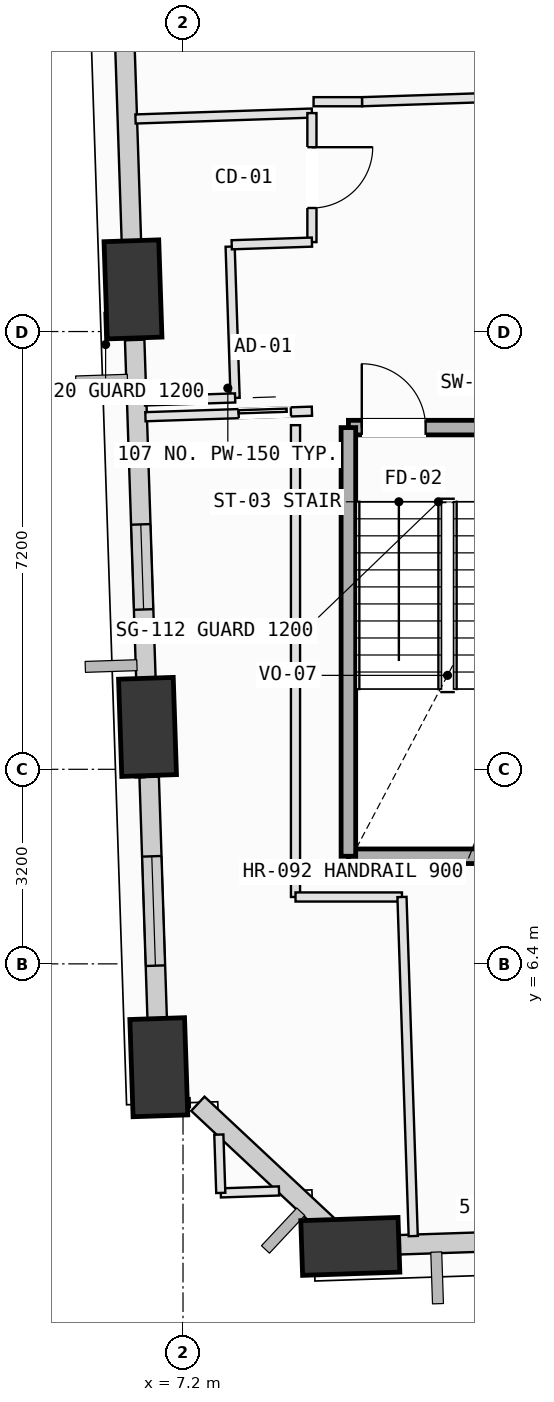
"""IFC4 building model, lengths in metres.
Left out: names, types, materials, properties, quantities, classifications, styles, units other than length and angle.
Written with IfcOpenShell. Run it as: python <this file> out.ifc"""

import sys

from ifc_helpers import new_model, si_unit, direction, frame, frame_2d, origin, origin_2d, place, context, subcontext, project, spatial, rectangle, extrude, element, fill, save


model = new_model("IFC4")
c1 = context("Model", 3, precision=1e-05, world=origin(), true_north=direction((0.0, 1.0)))
c2 = subcontext(c1, "Body", "Model", "MODEL_VIEW")
j1 = project(units=[si_unit("LENGTHUNIT", "METRE"), si_unit("PLANEANGLEUNIT", "RADIAN")], contexts=[c1])
p1 = place(None, origin())
s1 = spatial("IfcSite", under=j1, at=p1, CompositionType="ELEMENT")
p2 = place(p1, origin())
s2 = spatial("IfcBuilding", under=s1, at=p2, CompositionType="ELEMENT")
p3 = place(p2, frame((0.0, 0.0, 31.0)))
s3 = spatial("IfcBuildingStorey", under=s2, at=p3, CompositionType="ELEMENT", Elevation=31.0)
p4 = place(p3, frame((9.951, 1.753, 0.002), z_axis=(0.095504651376, -0.096351967674, 0.990754843486), x_axis=(0.686707556707, 0.726919871615, 0.004497978688)))
e1 = element("IfcColumn", 1, at=p4, inside=s3, PredefinedType="COLUMN", context=c2, shape_type="SweptSolid", body=[
    extrude(rectangle(XDim=1.6, YDim=0.9, at=origin_2d()), origin(), (0.0, 0.0, 1.0), 4.034),
])
p5 = place(p3, frame((6.377, 17.493, 0.002), z_axis=(0.031004754725, -0.111823410878, 0.993244295208), x_axis=(-0.297184287136, 0.947750247641, 0.115978306483)))
e2 = element("IfcColumn", 2, at=p5, inside=s3, PredefinedType="COLUMN", context=c2, shape_type="SweptSolid", body=[
    extrude(rectangle(XDim=1.6, YDim=0.9, at=origin_2d()), origin(), (0.0, 0.0, 1.0), 4.024),
])
p6 = place(p3, frame((6.616, 10.297, 0.002), z_axis=(0.060540092343, -0.110475063404, 0.992033344996), x_axis=(-0.505555129361, 0.853558207703, 0.125906303413)))
e3 = element("IfcColumn", 3, at=p6, inside=s3, PredefinedType="COLUMN", context=c2, shape_type="SweptSolid", body=[
    extrude(rectangle(XDim=1.6, YDim=0.9, at=origin_2d()), origin(), (0.0, 0.0, 1.0), 4.029),
])
p7 = place(p3, frame((6.802, 4.7, 0.002), z_axis=(0.083438905874, -0.109335825174, 0.99049665639), x_axis=(-0.62692721758, 0.766855060817, 0.13746119291)))
e4 = element("IfcColumn", 4, at=p7, inside=s3, PredefinedType="COLUMN", context=c2, shape_type="SweptSolid", body=[
    extrude(rectangle(XDim=1.6, YDim=0.9, at=origin_2d()), origin(), (0.0, 0.0, 1.0), 4.035),
])
p8 = place(p3, frame((16.742, 1.979, 0.0), z_axis=(0.0, 0.0, 1.0), x_axis=(-0.999449522474, -0.033176076121, 0.0)))
e5 = element("IfcWall", 5, at=p8, inside=s3, PredefinedType="SOLIDWALL", context=c2, shape_type="SweptSolid", body=[
    extrude(rectangle(XDim=6.034, YDim=0.32, at=frame_2d((3.017, 0.0))), origin(), (0.0, 0.0, 1.0), 3.165),
])
p9 = place(p8, frame((2.774, 0.0, 0.75)))
e6 = element("IfcOpeningElement", 6, at=p9, cuts=e5, PredefinedType="OPENING", context=c2, shape_type="SweptSolid", body=[
    extrude(rectangle(XDim=1.4, YDim=1.85, at=frame_2d((0.7, 0.925))), frame((0.0, 0.17, 0.0), z_axis=(0.0, -1.0, 0.0), x_axis=(1.0, 0.0, 0.0)), (0.0, 0.0, 1.0), 0.34),
])
p10 = place(p3, frame((6.365, 17.872, 0.0), z_axis=(0.0, 0.0, 1.0), x_axis=(-0.033150797565, 0.999450361259, 0.0)))
e7 = element("IfcWall", 7, at=p10, inside=s3, PredefinedType="SOLIDWALL", context=c2, shape_type="SweptSolid", body=[
    extrude(rectangle(XDim=7.136, YDim=0.32, at=frame_2d((3.568, 0.0))), origin(), (0.0, 0.0, 1.0), 3.165),
])
p11 = place(p10, frame((3.964, 0.0, 0.75)))
e8 = element("IfcOpeningElement", 8, at=p11, cuts=e7, PredefinedType="OPENING", context=c2, shape_type="SweptSolid", body=[
    extrude(rectangle(XDim=2.0, YDim=1.95, at=frame_2d((1.0, 0.975))), frame((0.0, 0.17, 0.0), z_axis=(0.0, -1.0, 0.0), x_axis=(1.0, 0.0, 0.0)), (0.0, 0.0, 1.0), 0.34),
])
p12 = place(p3, frame((6.604, 10.667, 0.0), z_axis=(0.0, 0.0, 1.0), x_axis=(-0.033177928016, 0.999449461, 0.0)))
e9 = element("IfcWall", 9, at=p12, inside=s3, PredefinedType="SOLIDWALL", context=c2, shape_type="SweptSolid", body=[
    extrude(rectangle(XDim=5.997, YDim=0.32, at=frame_2d((2.999, 0.0))), origin(), (0.0, 0.0, 1.0), 3.165),
])
p13 = place(p12, frame((1.562, 0.0, 0.75)))
e10 = element("IfcOpeningElement", 10, at=p13, cuts=e9, PredefinedType="OPENING", context=c2, shape_type="SweptSolid", body=[
    extrude(rectangle(XDim=1.4, YDim=1.85, at=frame_2d((0.7, 0.925))), frame((0.0, 0.17, 0.0), z_axis=(0.0, -1.0, 0.0), x_axis=(1.0, 0.0, 0.0)), (0.0, 0.0, 1.0), 0.34),
])
p14 = place(p3, frame((6.79, 5.06, 0.0), z_axis=(0.0, 0.0, 1.0), x_axis=(-0.033169414577, 0.999449743577, 0.0)))
e11 = element("IfcWall", 11, at=p14, inside=s3, PredefinedType="SOLIDWALL", context=c2, shape_type="SweptSolid", body=[
    extrude(rectangle(XDim=4.416, YDim=0.32, at=frame_2d((2.208, 0.0))), origin(), (0.0, 0.0, 1.0), 3.165),
])
p15 = place(p14, frame((1.311, 0.0, 0.75)))
e12 = element("IfcOpeningElement", 12, at=p15, cuts=e11, PredefinedType="OPENING", context=c2, shape_type="SweptSolid", body=[
    extrude(rectangle(XDim=1.8, YDim=2.05, at=frame_2d((0.9, 1.025))), frame((0.0, 0.17, 0.0), z_axis=(0.0, -1.0, 0.0), x_axis=(1.0, 0.0, 0.0)), (0.0, 0.0, 1.0), 0.34),
])
p16 = place(p3, frame((9.707, 1.982, 0.0), z_axis=(0.0, 0.0, 1.0), x_axis=(-0.730192805604, 0.683241148237, 0.0)))
e13 = element("IfcWall", 13, at=p16, inside=s3, PredefinedType="SOLIDWALL", context=c2, shape_type="SweptSolid", body=[
    extrude(rectangle(XDim=3.099, YDim=0.32, at=frame_2d((1.55, 0.0))), origin(), (0.0, 0.0, 1.0), 3.165),
])
p17 = place(p3, frame((9.92, 15.22, 0.0), z_axis=(0.0, 0.0, 1.0), x_axis=(1.0, 0.0, 0.0)))
e14 = element("IfcWall", 14, at=p17, inside=s3, PredefinedType="SOLIDWALL", context=c2, shape_type="SweptSolid", body=[
    extrude(rectangle(XDim=3.26, YDim=0.24, at=frame_2d((1.63, 0.0))), origin(), (0.0, 0.0, 1.0), 3.78),
])
p18 = place(p17, frame((0.22, 0.0, 0.0)))
e15 = element("IfcOpeningElement", 15, at=p18, cuts=e14, PredefinedType="OPENING", context=c2, shape_type="SweptSolid", body=[
    extrude(rectangle(XDim=1.05, YDim=2.15, at=frame_2d((0.525, 1.075))), frame((0.0, 0.13, 0.0), z_axis=(0.0, -1.0, 0.0), x_axis=(1.0, 0.0, 0.0)), (0.0, 0.0, 1.0), 0.26),
])
p19 = place(p3, frame((13.18, 8.17, 0.0), z_axis=(0.0, 0.0, 1.0), x_axis=(-1.0, 0.0, 0.0)))
e16 = element("IfcWall", 16, at=p19, inside=s3, PredefinedType="SOLIDWALL", context=c2, shape_type="SweptSolid", body=[
    extrude(rectangle(XDim=3.26, YDim=0.24, at=frame_2d((1.63, 0.0))), origin(), (0.0, 0.0, 1.0), 3.78),
])
p20 = place(p3, frame((9.92, 8.17, 0.0), z_axis=(0.0, 0.0, 1.0), x_axis=(0.0, 1.0, 0.0)))
e17 = element("IfcWall", 17, at=p20, inside=s3, PredefinedType="SOLIDWALL", context=c2, shape_type="SweptSolid", body=[
    extrude(rectangle(XDim=7.05, YDim=0.24, at=frame_2d((3.525, 0.0))), origin(), (0.0, 0.0, 1.0), 3.78),
])
p21 = place(p3, frame((6.582, 15.399, 0.0), z_axis=(0.0, 0.0, 1.0), x_axis=(0.999447376951, 0.033240648382, 0.0)))
e18 = element("IfcWall", 18, at=p21, inside=s3, PredefinedType="PARTITIONING", context=c2, shape_type="SweptSolid", body=[
    extrude(rectangle(XDim=2.74, YDim=0.15, at=frame_2d((1.37, 0.0))), origin(), (0.0, 0.0, 1.0), 3.78),
])
p22 = place(p21, frame((1.533, 0.0, 0.0)))
e19 = element("IfcOpeningElement", 19, at=p22, cuts=e18, PredefinedType="OPENING", context=c2, shape_type="SweptSolid", body=[
    extrude(rectangle(XDim=0.86, YDim=2.06, at=frame_2d((0.43, 1.03))), frame((0.0, 0.085, 0.0), z_axis=(0.0, -1.0, 0.0), x_axis=(1.0, 0.0, 0.0)), (0.0, 0.0, 1.0), 0.17),
])
p23 = place(p3, frame((9.05, 15.26, 0.0), z_axis=(0.0, 0.0, 1.0), x_axis=(0.0, -1.0, 0.0)))
e20 = element("IfcWall", 20, at=p23, inside=s3, PredefinedType="PARTITIONING", context=c2, shape_type="SweptSolid", body=[
    extrude(rectangle(XDim=7.76, YDim=0.15, at=frame_2d((3.88, 0.0))), origin(), (0.0, 0.0, 1.0), 3.78),
])
p24 = place(p3, frame((9.05, 7.5, 0.0), z_axis=(0.0, 0.0, 1.0), x_axis=(1.0, 0.0, 0.0)))
e21 = element("IfcWall", 21, at=p24, inside=s3, PredefinedType="PARTITIONING", context=c2, shape_type="SweptSolid", body=[
    extrude(rectangle(XDim=1.751, YDim=0.15, at=frame_2d((0.875, 0.0))), origin(), (0.0, 0.0, 1.0), 3.78),
])
p25 = place(p3, frame((10.801, 7.5, 0.0), z_axis=(0.0, 0.0, 1.0), x_axis=(0.03316477793, -0.999449897446, 0.0)))
e22 = element("IfcWall", 22, at=p25, inside=s3, PredefinedType="PARTITIONING", context=c2, shape_type="SweptSolid", body=[
    extrude(rectangle(XDim=5.58, YDim=0.15, at=frame_2d((2.79, 0.0))), origin(), (0.0, 0.0, 1.0), 3.78),
])
p26 = place(p3, frame((10.718, 1.549, 0.0), z_axis=(0.0, 0.0, 1.0), x_axis=(-0.999424194326, -0.033930514232, 0.0)))
e23 = element("IfcWall", 23, at=p26, inside=s3, PredefinedType="PARTITIONING", context=c2, shape_type="SweptSolid", body=[
    extrude(rectangle(XDim=1.36, YDim=0.15, at=frame_2d((0.68, 0.0))), origin(), (0.0, 0.0, 1.0), 3.165),
])
p27 = place(p3, frame((9.359, 1.503, 0.0), z_axis=(0.0, 0.0, 1.0), x_axis=(-0.032831793986, 0.999460891333, 0.0)))
e24 = element("IfcWall", 24, at=p27, inside=s3, PredefinedType="PARTITIONING", context=c2, shape_type="SweptSolid", body=[
    extrude(rectangle(XDim=0.639, YDim=0.15, at=frame_2d((0.32, 0.0))), origin(), (0.0, 0.0, 1.0), 3.78),
])
p28 = place(p3, frame((8.779, 2.665, 0.0), z_axis=(0.0, 0.0, 1.0), x_axis=(-0.999443209568, -0.033365713673, 0.0)))
e25 = element("IfcWall", 25, at=p28, inside=s3, PredefinedType="PARTITIONING", context=c2, shape_type="SweptSolid", body=[
    extrude(rectangle(XDim=0.958, YDim=0.15, at=frame_2d((0.479, 0.0))), origin(), (0.0, 0.0, 1.0), 3.78),
])
p29 = place(p3, frame((7.821, 2.633, 0.0), z_axis=(0.0, 0.0, 1.0), x_axis=(-0.033331774136, 0.999444342039, 0.0)))
e26 = element("IfcWall", 26, at=p29, inside=s3, PredefinedType="PARTITIONING", context=c2, shape_type="SweptSolid", body=[
    extrude(rectangle(XDim=0.959, YDim=0.15, at=frame_2d((0.48, 0.0))), origin(), (0.0, 0.0, 1.0), 3.78),
])
p30 = place(p3, frame((7.311, 4.117, 0.0), z_axis=(0.0, 0.0, 1.0), x_axis=(-0.999460479582, -0.032844326039, 0.0)))
e27 = element("IfcWall", 27, at=p30, inside=s3, PredefinedType="PARTITIONING", context=c2, shape_type="SweptSolid", body=[
    extrude(rectangle(XDim=0.639, YDim=0.15, at=frame_2d((0.32, 0.0))), origin(), (0.0, 0.0, 1.0), 3.78),
])
p31 = place(p3, frame((6.672, 4.096, 0.0), z_axis=(0.0, 0.0, 1.0), x_axis=(-0.033585929233, 0.999435833537, 0.0)))
e28 = element("IfcWall", 28, at=p31, inside=s3, PredefinedType="PARTITIONING", context=c2, shape_type="SweptSolid", body=[
    extrude(rectangle(XDim=0.959, YDim=0.15, at=frame_2d((0.48, 0.0))), origin(), (0.0, 0.0, 1.0), 3.78),
])
p32 = place(p3, frame((6.494, 9.469, 0.0), z_axis=(0.0, 0.0, 1.0), x_axis=(-0.033308026334, 0.999445133753, 0.0)))
e29 = element("IfcWall", 29, at=p32, inside=s3, PredefinedType="PARTITIONING", context=c2, shape_type="SweptSolid", body=[
    extrude(rectangle(XDim=1.195, YDim=0.15, at=frame_2d((0.597, 0.0))), origin(), (0.0, 0.0, 1.0), 3.165),
])
p33 = place(p3, frame((7.975, 18.197, 0.0), z_axis=(0.0, 0.0, 1.0), x_axis=(0.032841519525, -0.999460571806, 0.0)))
e30 = element("IfcWall", 30, at=p33, inside=s3, PredefinedType="PARTITIONING", context=c2, shape_type="SweptSolid", body=[
    extrude(rectangle(XDim=2.49, YDim=0.15, at=frame_2d((1.245, 0.0))), origin(), (0.0, 0.0, 1.0), 3.78),
])
p34 = place(p3, frame((8.057, 15.708, 0.0), z_axis=(0.0, 0.0, 1.0), x_axis=(-0.999453632714, -0.03305202043, 0.0)))
e31 = element("IfcWall", 31, at=p34, inside=s3, PredefinedType="PARTITIONING", context=c2, shape_type="SweptSolid", body=[
    extrude(rectangle(XDim=1.485, YDim=0.15, at=frame_2d((0.742, 0.0))), origin(), (0.0, 0.0, 1.0), 3.78),
])
p35 = place(p3, frame((6.419, 20.296, 0.0), z_axis=(0.0, 0.0, 1.0), x_axis=(0.999439573388, 0.033474455121, 0.0)))
e32 = element("IfcWall", 32, at=p35, inside=s3, PredefinedType="PARTITIONING", context=c2, shape_type="SweptSolid", body=[
    extrude(rectangle(XDim=2.903, YDim=0.15, at=frame_2d((1.451, 0.0))), origin(), (0.0, 0.0, 1.0), 3.78),
])
p36 = place(p3, frame((9.32, 20.393, 0.0), z_axis=(0.0, 0.0, 1.0), x_axis=(0.0, -1.0, 0.0)))
e33 = element("IfcWall", 33, at=p36, inside=s3, PredefinedType="PARTITIONING", context=c2, shape_type="SweptSolid", body=[
    extrude(rectangle(XDim=2.122, YDim=0.15, at=frame_2d((1.061, 0.0))), origin(), (0.0, 0.0, 1.0), 3.78),
])
p37 = place(p36, frame((0.561, 0.0, 0.0)))
e34 = element("IfcOpeningElement", 34, at=p37, cuts=e33, PredefinedType="OPENING", context=c2, shape_type="SweptSolid", body=[
    extrude(rectangle(XDim=1.0, YDim=2.12, at=frame_2d((0.5, 1.06))), frame((0.0, 0.085, 0.0), z_axis=(0.0, -1.0, 0.0), x_axis=(1.0, 0.0, 0.0)), (0.0, 0.0, 1.0), 0.17),
])
p38 = place(p3, frame((9.32, 18.271, 0.0), z_axis=(0.0, 0.0, 1.0), x_axis=(-0.999445522723, -0.033296352784, 0.0)))
e35 = element("IfcWall", 35, at=p38, inside=s3, PredefinedType="PARTITIONING", context=c2, shape_type="SweptSolid", body=[
    extrude(rectangle(XDim=1.32, YDim=0.15, at=frame_2d((0.66, 0.0))), origin(), (0.0, 0.0, 1.0), 3.78),
])
p39 = place(p3, frame((15.824, 20.768, 0.0), z_axis=(0.0, 0.0, 1.0), x_axis=(-0.999452746279, -0.033078814298, 0.0)))
e36 = element("IfcWall", 36, at=p39, inside=s3, PredefinedType="PARTITIONING", context=c2, shape_type="SweptSolid", body=[
    extrude(rectangle(XDim=5.683, YDim=0.15, at=frame_2d((2.842, 0.0))), origin(), (0.0, 0.0, 1.0), 3.78),
])
p40 = place(p39, frame((2.242, 0.0, 0.0)))
e37 = element("IfcOpeningElement", 37, at=p40, cuts=e36, PredefinedType="OPENING", context=c2, shape_type="SweptSolid", body=[
    extrude(rectangle(XDim=1.2, YDim=2.15, at=frame_2d((0.6, 1.075))), frame((0.0, 0.085, 0.0), z_axis=(0.0, -1.0, 0.0), x_axis=(1.0, 0.0, 0.0)), (0.0, 0.0, 1.0), 0.17),
])
p41 = place(p3, frame((10.144, 20.58, 0.0), z_axis=(0.0, 0.0, 1.0), x_axis=(-1.0, 0.0, 0.0)))
e38 = element("IfcWall", 38, at=p41, inside=s3, PredefinedType="PARTITIONING", context=c2, shape_type="SweptSolid", body=[
    extrude(rectangle(XDim=0.797, YDim=0.15, at=frame_2d((0.398, 0.0))), origin(), (0.0, 0.0, 1.0), 3.78),
])
p42 = place(p13, origin())
e39 = element("IfcWindow", 39, at=p42, inside=s3, PartitioningType="SINGLE_PANEL", PredefinedType="WINDOW", context=c2, shape_type="SweptSolid", body=[
    extrude(rectangle(XDim=1.4, YDim=1.85, at=frame_2d((0.7, 0.925))), frame((0.0, 0.03, 0.0), z_axis=(0.0, -1.0, 0.0), x_axis=(1.0, 0.0, 0.0)), (0.0, 0.0, 1.0), 0.06),
])
fill(e10, e39)
p43 = place(p15, origin())
e40 = element("IfcWindow", 40, at=p43, inside=s3, PartitioningType="SINGLE_PANEL", PredefinedType="WINDOW", context=c2, shape_type="SweptSolid", body=[
    extrude(rectangle(XDim=1.8, YDim=2.05, at=frame_2d((0.9, 1.025))), frame((0.0, 0.03, 0.0), z_axis=(0.0, -1.0, 0.0), x_axis=(1.0, 0.0, 0.0)), (0.0, 0.0, 1.0), 0.06),
])
fill(e12, e40)
p44 = place(p18, origin())
e41 = element("IfcDoor", 41, at=p44, inside=s3, OperationType="SINGLE_SWING_LEFT", PredefinedType="DOOR", context=c2, shape_type="SweptSolid", body=[
    extrude(rectangle(XDim=1.05, YDim=2.15, at=frame_2d((0.525, 1.075))), frame((0.0, 0.025, 0.0), z_axis=(0.0, -1.0, 0.0), x_axis=(1.0, 0.0, 0.0)), (0.0, 0.0, 1.0), 0.05),
])
fill(e15, e41)
p45 = place(p22, origin())
e42 = element("IfcDoor", 42, at=p45, inside=s3, OperationType="SLIDING_TO_LEFT", PredefinedType="DOOR", context=c2, shape_type="SweptSolid", body=[
    extrude(rectangle(XDim=0.86, YDim=2.06, at=frame_2d((0.43, 1.03))), frame((0.0, 0.025, 0.0), z_axis=(0.0, -1.0, 0.0), x_axis=(1.0, 0.0, 0.0)), (0.0, 0.0, 1.0), 0.05),
])
fill(e19, e42)
p46 = place(p37, origin())
e43 = element("IfcDoor", 43, at=p46, inside=s3, OperationType="SINGLE_SWING_LEFT", PredefinedType="DOOR", context=c2, shape_type="SweptSolid", body=[
    extrude(rectangle(XDim=1.0, YDim=2.12, at=frame_2d((0.5, 1.06))), frame((0.0, 0.025, 0.0), z_axis=(0.0, -1.0, 0.0), x_axis=(1.0, 0.0, 0.0)), (0.0, 0.0, 1.0), 0.05),
])
fill(e34, e43)
save(model, sys.argv[1])
